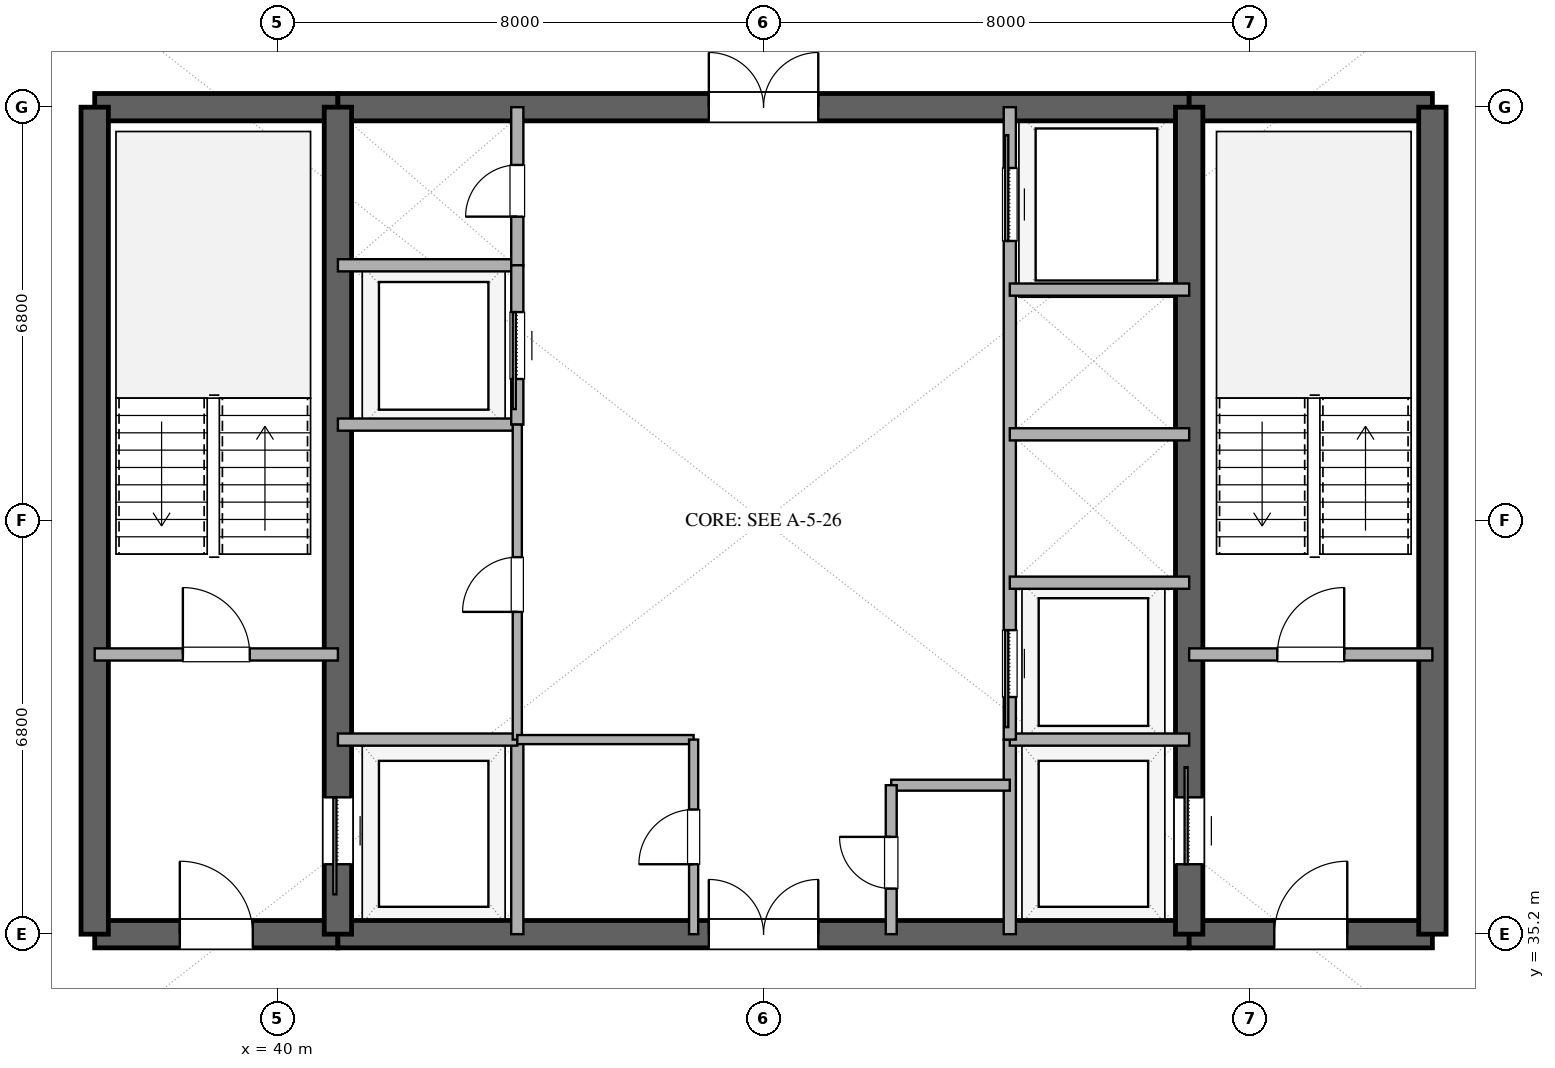
"""IFC4 building model, lengths in metres.
Left out: names, types, materials, properties, quantities, classifications, styles, units other than length and angle.
Written with IfcOpenShell. Run it as: python <this file> out.ifc"""

import sys

from ifc_helpers import new_model, si_unit, direction, frame, frame_2d, origin, place, context, subcontext, project, spatial, rectangle, extrude, element, fill, save


model = new_model("IFC4")
c1 = context("Model", 3, precision=1e-05, world=origin(), true_north=direction((0.0, 1.0)))
c2 = subcontext(c1, "Body", "Model", "MODEL_VIEW")
j1 = project(units=[si_unit("LENGTHUNIT", "METRE"), si_unit("PLANEANGLEUNIT", "RADIAN")], contexts=[c1])
p1 = place(None, origin())
s1 = spatial("IfcSite", under=j1, at=p1, CompositionType="ELEMENT")
p2 = place(p1, origin())
s2 = spatial("IfcBuilding", under=s1, at=p2, CompositionType="ELEMENT")
p3 = place(p2, frame((0.0, 0.0, 165.0)))
s3 = spatial("IfcBuildingStorey", under=s2, at=p3, CompositionType="ELEMENT", Elevation=165.0)
p4 = place(p3, frame((37.0, 35.2, 0.0), z_axis=(0.0, 0.0, 1.0), x_axis=(1.0, 0.0, 0.0)))
e1 = element("IfcWall", 1, at=p4, inside=s3, PredefinedType="SHEAR", context=c2, shape_type="SweptSolid", body=[
    extrude(rectangle(XDim=4.0, YDim=0.45, at=frame_2d((2.0, 0.0))), origin(), (0.0, 0.0, 1.0), 3.38),
])
p5 = place(p4, frame((1.4, 0.0, 0.0)))
e2 = element("IfcOpeningElement", 2, at=p5, cuts=e1, PredefinedType="OPENING", context=c2, shape_type="SweptSolid", body=[
    extrude(rectangle(XDim=1.2, YDim=2.15, at=frame_2d((0.6, 1.075))), frame((0.0, 0.235, 0.0), z_axis=(0.0, -1.0, 0.0), x_axis=(1.0, 0.0, 0.0)), (0.0, 0.0, 1.0), 0.47),
])
p6 = place(p3, frame((41.0, 35.2, 0.0), z_axis=(0.0, 0.0, 1.0), x_axis=(1.0, 0.0, 0.0)))
e3 = element("IfcWall", 3, at=p6, inside=s3, PredefinedType="SHEAR", context=c2, shape_type="SweptSolid", body=[
    extrude(rectangle(XDim=14.0, YDim=0.45, at=frame_2d((7.0, 0.0))), origin(), (0.0, 0.0, 1.0), 3.38),
])
p7 = place(p6, frame((6.1, 0.0, 0.0)))
e4 = element("IfcOpeningElement", 4, at=p7, cuts=e3, PredefinedType="OPENING", context=c2, shape_type="SweptSolid", body=[
    extrude(rectangle(XDim=1.8, YDim=2.25, at=frame_2d((0.9, 1.125))), frame((0.0, 0.235, 0.0), z_axis=(0.0, -1.0, 0.0), x_axis=(1.0, 0.0, 0.0)), (0.0, 0.0, 1.0), 0.47),
])
p8 = place(p3, frame((55.0, 35.2, 0.0), z_axis=(0.0, 0.0, 1.0), x_axis=(1.0, 0.0, 0.0)))
e5 = element("IfcWall", 5, at=p8, inside=s3, PredefinedType="SHEAR", context=c2, shape_type="SweptSolid", body=[
    extrude(rectangle(XDim=4.0, YDim=0.45, at=frame_2d((2.0, 0.0))), origin(), (0.0, 0.0, 1.0), 3.38),
])
p9 = place(p8, frame((1.4, 0.0, 0.0)))
e6 = element("IfcOpeningElement", 6, at=p9, cuts=e5, PredefinedType="OPENING", context=c2, shape_type="SweptSolid", body=[
    extrude(rectangle(XDim=1.2, YDim=2.15, at=frame_2d((0.6, 1.075))), frame((0.0, 0.235, 0.0), z_axis=(0.0, -1.0, 0.0), x_axis=(1.0, 0.0, 0.0)), (0.0, 0.0, 1.0), 0.47),
])
p10 = place(p3, frame((37.0, 48.8, 0.0), z_axis=(0.0, 0.0, 1.0), x_axis=(1.0, 0.0, 0.0)))
e7 = element("IfcWall", 7, at=p10, inside=s3, PredefinedType="SHEAR", context=c2, shape_type="SweptSolid", body=[
    extrude(rectangle(XDim=4.0, YDim=0.45, at=frame_2d((2.0, 0.0))), origin(), (0.0, 0.0, 1.0), 3.38),
])
p11 = place(p3, frame((41.0, 48.8, 0.0), z_axis=(0.0, 0.0, 1.0), x_axis=(1.0, 0.0, 0.0)))
e8 = element("IfcWall", 8, at=p11, inside=s3, PredefinedType="SHEAR", context=c2, shape_type="SweptSolid", body=[
    extrude(rectangle(XDim=14.0, YDim=0.45, at=frame_2d((7.0, 0.0))), origin(), (0.0, 0.0, 1.0), 3.38),
])
p12 = place(p11, frame((6.1, 0.0, 0.0)))
e9 = element("IfcOpeningElement", 9, at=p12, cuts=e8, PredefinedType="OPENING", context=c2, shape_type="SweptSolid", body=[
    extrude(rectangle(XDim=1.8, YDim=2.25, at=frame_2d((0.9, 1.125))), frame((0.0, 0.235, 0.0), z_axis=(0.0, -1.0, 0.0), x_axis=(1.0, 0.0, 0.0)), (0.0, 0.0, 1.0), 0.47),
])
p13 = place(p3, frame((55.0, 48.8, 0.0), z_axis=(0.0, 0.0, 1.0), x_axis=(1.0, 0.0, 0.0)))
e10 = element("IfcWall", 10, at=p13, inside=s3, PredefinedType="SHEAR", context=c2, shape_type="SweptSolid", body=[
    extrude(rectangle(XDim=4.0, YDim=0.45, at=frame_2d((2.0, 0.0))), origin(), (0.0, 0.0, 1.0), 3.38),
])
for number, where, z_axis, x_axis in (
    (11, (37.0, 35.2, 0.0), (0.0, 0.0, 1.0), (0.0, 1.0, 0.0)),
    (12, (59.0, 35.2, 0.0), (0.0, 0.0, 1.0), (0.0, 1.0, 0.0)),
):
    element("IfcWall", number, at=place(p3, frame(where, z_axis=z_axis, x_axis=x_axis)), inside=s3, PredefinedType="SHEAR", context=c2, shape_type="SweptSolid", body=[
        extrude(rectangle(XDim=13.6, YDim=0.45, at=frame_2d((6.8, 0.0))), origin(), (0.0, 0.0, 1.0), 3.38),
    ])
p14 = place(p3, frame((41.0, 35.2, 0.0), z_axis=(0.0, 0.0, 1.0), x_axis=(0.0, 1.0, 0.0)))
e13 = element("IfcWall", 13, at=p14, inside=s3, PredefinedType="SHEAR", context=c2, shape_type="SweptSolid", body=[
    extrude(rectangle(XDim=13.6, YDim=0.45, at=frame_2d((6.8, 0.0))), origin(), (0.0, 0.0, 1.0), 3.38),
])
p15 = place(p14, frame((1.15, 0.0, 0.0)))
e14 = element("IfcOpeningElement", 14, at=p15, cuts=e13, PredefinedType="OPENING", context=c2, shape_type="SweptSolid", body=[
    extrude(rectangle(XDim=1.1, YDim=2.2, at=frame_2d((0.55, 1.1))), frame((0.0, 0.235, 0.0), z_axis=(0.0, -1.0, 0.0), x_axis=(1.0, 0.0, 0.0)), (0.0, 0.0, 1.0), 0.47),
])
p16 = place(p3, frame((55.0, 35.2, 0.0), z_axis=(0.0, 0.0, 1.0), x_axis=(0.0, 1.0, 0.0)))
e15 = element("IfcWall", 15, at=p16, inside=s3, PredefinedType="SHEAR", context=c2, shape_type="SweptSolid", body=[
    extrude(rectangle(XDim=13.6, YDim=0.45, at=frame_2d((6.8, 0.0))), origin(), (0.0, 0.0, 1.0), 3.38),
])
p17 = place(p16, frame((1.15, 0.0, 0.0)))
e16 = element("IfcOpeningElement", 16, at=p17, cuts=e15, PredefinedType="OPENING", context=c2, shape_type="SweptSolid", body=[
    extrude(rectangle(XDim=1.1, YDim=2.2, at=frame_2d((0.55, 1.1))), frame((0.0, 0.235, 0.0), z_axis=(0.0, -1.0, 0.0), x_axis=(1.0, 0.0, 0.0)), (0.0, 0.0, 1.0), 0.47),
])
p18 = place(p3, frame((37.0, 39.8, 0.0), z_axis=(0.0, 0.0, 1.0), x_axis=(1.0, 0.0, 0.0)))
e17 = element("IfcWall", 17, at=p18, inside=s3, PredefinedType="SOLIDWALL", context=c2, shape_type="SweptSolid", body=[
    extrude(rectangle(XDim=4.0, YDim=0.2, at=frame_2d((2.0, 0.0))), origin(), (0.0, 0.0, 1.0), 2.74),
])
p19 = place(p18, frame((1.45, 0.0, 0.0)))
e18 = element("IfcOpeningElement", 18, at=p19, cuts=e17, PredefinedType="OPENING", context=c2, shape_type="SweptSolid", body=[
    extrude(rectangle(XDim=1.1, YDim=2.15, at=frame_2d((0.55, 1.075))), frame((0.0, 0.11, 0.0), z_axis=(0.0, -1.0, 0.0), x_axis=(1.0, 0.0, 0.0)), (0.0, 0.0, 1.0), 0.22),
])
p20 = place(p3, frame((55.0, 39.8, 0.0), z_axis=(0.0, 0.0, 1.0), x_axis=(1.0, 0.0, 0.0)))
e19 = element("IfcWall", 19, at=p20, inside=s3, PredefinedType="SOLIDWALL", context=c2, shape_type="SweptSolid", body=[
    extrude(rectangle(XDim=4.0, YDim=0.2, at=frame_2d((2.0, 0.0))), origin(), (0.0, 0.0, 1.0), 2.74),
])
p21 = place(p20, frame((1.45, 0.0, 0.0)))
e20 = element("IfcOpeningElement", 20, at=p21, cuts=e19, PredefinedType="OPENING", context=c2, shape_type="SweptSolid", body=[
    extrude(rectangle(XDim=1.1, YDim=2.15, at=frame_2d((0.55, 1.075))), frame((0.0, 0.11, 0.0), z_axis=(0.0, -1.0, 0.0), x_axis=(1.0, 0.0, 0.0)), (0.0, 0.0, 1.0), 0.22),
])
p22 = place(p3, frame((43.95, 35.2, 0.0), z_axis=(0.0, 0.0, 1.0), x_axis=(0.0, 1.0, 0.0)))
e21 = element("IfcWall", 21, at=p22, inside=s3, PredefinedType="SOLIDWALL", context=c2, shape_type="SweptSolid", body=[
    extrude(rectangle(XDim=3.2, YDim=0.2, at=frame_2d((1.6, 0.0))), origin(), (0.0, 0.0, 1.0), 2.74),
])
p23 = place(p3, frame((41.0, 38.4, 0.0), z_axis=(0.0, 0.0, 1.0), x_axis=(1.0, 0.0, 0.0)))
e22 = element("IfcWall", 22, at=p23, inside=s3, PredefinedType="SOLIDWALL", context=c2, shape_type="SweptSolid", body=[
    extrude(rectangle(XDim=2.95, YDim=0.2, at=frame_2d((1.475, 0.0))), origin(), (0.0, 0.0, 1.0), 2.74),
])
p24 = place(p3, frame((52.05, 35.2, 0.0), z_axis=(0.0, 0.0, 1.0), x_axis=(0.0, 1.0, 0.0)))
e23 = element("IfcWall", 23, at=p24, inside=s3, PredefinedType="SOLIDWALL", context=c2, shape_type="SweptSolid", body=[
    extrude(rectangle(XDim=3.2, YDim=0.2, at=frame_2d((1.6, 0.0))), origin(), (0.0, 0.0, 1.0), 2.74),
])
for number, where, z_axis, x_axis in (
    (24, (52.05, 38.4, 0.0), (0.0, 0.0, 1.0), (1.0, 0.0, 0.0)),
    (25, (41.0, 46.2, 0.0), (0.0, 0.0, 1.0), (1.0, 0.0, 0.0)),
):
    element("IfcWall", number, at=place(p3, frame(where, z_axis=z_axis, x_axis=x_axis)), inside=s3, PredefinedType="SOLIDWALL", context=c2, shape_type="SweptSolid", body=[
        extrude(rectangle(XDim=2.95, YDim=0.2, at=frame_2d((1.475, 0.0))), origin(), (0.0, 0.0, 1.0), 2.74),
    ])
p25 = place(p3, frame((43.95, 46.2, 0.0), z_axis=(0.0, 0.0, 1.0), x_axis=(0.0, 1.0, 0.0)))
e26 = element("IfcWall", 26, at=p25, inside=s3, PredefinedType="SOLIDWALL", context=c2, shape_type="SweptSolid", body=[
    extrude(rectangle(XDim=2.6, YDim=0.2, at=frame_2d((1.3, 0.0))), origin(), (0.0, 0.0, 1.0), 2.74),
])
p26 = place(p25, frame((0.8, 0.0, 0.0)))
e27 = element("IfcOpeningElement", 27, at=p26, cuts=e26, PredefinedType="OPENING", context=c2, shape_type="SweptSolid", body=[
    extrude(rectangle(XDim=0.85, YDim=2.15, at=frame_2d((0.425, 1.075))), frame((0.0, 0.11, 0.0), z_axis=(0.0, -1.0, 0.0), x_axis=(1.0, 0.0, 0.0)), (0.0, 0.0, 1.0), 0.22),
])
p27 = place(p3, frame((41.0, 43.58, 0.0), z_axis=(0.0, 0.0, 1.0), x_axis=(1.0, 0.0, 0.0)))
e28 = element("IfcWall", 28, at=p27, inside=s3, PredefinedType="SOLIDWALL", context=c2, shape_type="SweptSolid", body=[
    extrude(rectangle(XDim=2.95, YDim=0.2, at=frame_2d((1.475, 0.0))), origin(), (0.0, 0.0, 1.0), 2.74),
])
p28 = place(p3, frame((43.95, 43.58, 0.0), z_axis=(0.0, 0.0, 1.0), x_axis=(0.0, 1.0, 0.0)))
e29 = element("IfcWall", 29, at=p28, inside=s3, PredefinedType="SOLIDWALL", context=c2, shape_type="SweptSolid", body=[
    extrude(rectangle(XDim=2.62, YDim=0.2, at=frame_2d((1.31, 0.0))), origin(), (0.0, 0.0, 1.0), 2.74),
])
p29 = place(p28, frame((0.75, 0.0, 0.0)))
e30 = element("IfcOpeningElement", 30, at=p29, cuts=e29, PredefinedType="OPENING", context=c2, shape_type="SweptSolid", body=[
    extrude(rectangle(XDim=1.1, YDim=2.2, at=frame_2d((0.55, 1.1))), frame((0.0, 0.11, 0.0), z_axis=(0.0, -1.0, 0.0), x_axis=(1.0, 0.0, 0.0)), (0.0, 0.0, 1.0), 0.22),
])
p30 = place(p3, frame((43.95, 38.4, 0.0), z_axis=(0.0, 0.0, 1.0), x_axis=(0.0, 1.0, 0.0)))
e31 = element("IfcWall", 31, at=p30, inside=s3, PredefinedType="PARTITIONING", context=c2, shape_type="SweptSolid", body=[
    extrude(rectangle(XDim=5.18, YDim=0.15, at=frame_2d((2.59, 0.0))), origin(), (0.0, 0.0, 1.0), 2.74),
])
p31 = place(p30, frame((2.1, 0.0, 0.0)))
e32 = element("IfcOpeningElement", 32, at=p31, cuts=e31, PredefinedType="OPENING", context=c2, shape_type="SweptSolid", body=[
    extrude(rectangle(XDim=0.9, YDim=2.15, at=frame_2d((0.45, 1.075))), frame((0.0, 0.085, 0.0), z_axis=(0.0, -1.0, 0.0), x_axis=(1.0, 0.0, 0.0)), (0.0, 0.0, 1.0), 0.17),
])
p32 = place(p3, frame((52.05, 38.4, 0.0), z_axis=(0.0, 0.0, 1.0), x_axis=(0.0, 1.0, 0.0)))
e33 = element("IfcWall", 33, at=p32, inside=s3, PredefinedType="SOLIDWALL", context=c2, shape_type="SweptSolid", body=[
    extrude(rectangle(XDim=10.4, YDim=0.2, at=frame_2d((5.2, 0.0))), origin(), (0.0, 0.0, 1.0), 2.74),
])
p33 = place(p32, frame((0.7, 0.0, 0.0)))
e34 = element("IfcOpeningElement", 34, at=p33, cuts=e33, PredefinedType="OPENING", context=c2, shape_type="SweptSolid", body=[
    extrude(rectangle(XDim=1.1, YDim=2.2, at=frame_2d((0.55, 1.1))), frame((0.0, 0.11, 0.0), z_axis=(0.0, -1.0, 0.0), x_axis=(1.0, 0.0, 0.0)), (0.0, 0.0, 1.0), 0.22),
])
p34 = place(p32, frame((8.2, 0.0, 0.0)))
e35 = element("IfcOpeningElement", 35, at=p34, cuts=e33, PredefinedType="OPENING", context=c2, shape_type="SweptSolid", body=[
    extrude(rectangle(XDim=1.2, YDim=2.2, at=frame_2d((0.6, 1.1))), frame((0.0, 0.11, 0.0), z_axis=(0.0, -1.0, 0.0), x_axis=(1.0, 0.0, 0.0)), (0.0, 0.0, 1.0), 0.22),
])
for number, where, z_axis, x_axis in (
    (36, (52.05, 40.98, 0.0), (0.0, 0.0, 1.0), (1.0, 0.0, 0.0)),
    (37, (52.05, 43.42, 0.0), (0.0, 0.0, 1.0), (1.0, 0.0, 0.0)),
    (38, (52.05, 45.8, 0.0), (0.0, 0.0, 1.0), (1.0, 0.0, 0.0)),
):
    element("IfcWall", number, at=place(p3, frame(where, z_axis=z_axis, x_axis=x_axis)), inside=s3, PredefinedType="SOLIDWALL", context=c2, shape_type="SweptSolid", body=[
        extrude(rectangle(XDim=2.95, YDim=0.2, at=frame_2d((1.475, 0.0))), origin(), (0.0, 0.0, 1.0), 2.74),
    ])
p35 = place(p3, frame((43.95, 38.4, 0.0), z_axis=(0.0, 0.0, 1.0), x_axis=(1.0, 0.0, 0.0)))
e39 = element("IfcWall", 39, at=p35, inside=s3, PredefinedType="PARTITIONING", context=c2, shape_type="SweptSolid", body=[
    extrude(rectangle(XDim=2.9, YDim=0.15, at=frame_2d((1.45, 0.0))), origin(), (0.0, 0.0, 1.0), 2.74),
])
p36 = place(p3, frame((46.85, 35.2, 0.0), z_axis=(0.0, 0.0, 1.0), x_axis=(0.0, 1.0, 0.0)))
e40 = element("IfcWall", 40, at=p36, inside=s3, PredefinedType="PARTITIONING", context=c2, shape_type="SweptSolid", body=[
    extrude(rectangle(XDim=3.2, YDim=0.15, at=frame_2d((1.6, 0.0))), origin(), (0.0, 0.0, 1.0), 2.74),
])
p37 = place(p36, frame((1.15, 0.0, 0.0)))
e41 = element("IfcOpeningElement", 41, at=p37, cuts=e40, PredefinedType="OPENING", context=c2, shape_type="SweptSolid", body=[
    extrude(rectangle(XDim=0.9, YDim=2.15, at=frame_2d((0.45, 1.075))), frame((0.0, 0.085, 0.0), z_axis=(0.0, -1.0, 0.0), x_axis=(1.0, 0.0, 0.0)), (0.0, 0.0, 1.0), 0.17),
])
p38 = place(p3, frame((50.1, 37.65, 0.0), z_axis=(0.0, 0.0, 1.0), x_axis=(1.0, 0.0, 0.0)))
e42 = element("IfcWall", 42, at=p38, inside=s3, PredefinedType="PLUMBINGWALL", context=c2, shape_type="SweptSolid", body=[
    extrude(rectangle(XDim=1.95, YDim=0.18, at=frame_2d((0.975, 0.0))), origin(), (0.0, 0.0, 1.0), 2.74),
])
p39 = place(p3, frame((50.1, 35.2, 0.0), z_axis=(0.0, 0.0, 1.0), x_axis=(0.0, 1.0, 0.0)))
e43 = element("IfcWall", 43, at=p39, inside=s3, PredefinedType="PLUMBINGWALL", context=c2, shape_type="SweptSolid", body=[
    extrude(rectangle(XDim=2.45, YDim=0.18, at=frame_2d((1.225, 0.0))), origin(), (0.0, 0.0, 1.0), 2.74),
])
p40 = place(p39, frame((0.75, 0.0, 0.0)))
e44 = element("IfcOpeningElement", 44, at=p40, cuts=e43, PredefinedType="OPENING", context=c2, shape_type="SweptSolid", body=[
    extrude(rectangle(XDim=0.85, YDim=2.1, at=frame_2d((0.425, 1.05))), frame((0.0, 0.1, 0.0), z_axis=(0.0, -1.0, 0.0), x_axis=(1.0, 0.0, 0.0)), (0.0, 0.0, 1.0), 0.2),
])
p41 = place(p15, origin())
e45 = element("IfcDoor", 45, at=p41, inside=s3, OperationType="SLIDING_TO_LEFT", PredefinedType="DOOR", context=c2, shape_type="SweptSolid", body=[
    extrude(rectangle(XDim=1.1, YDim=2.2, at=frame_2d((0.55, 1.1))), frame((0.0, 0.025, 0.0), z_axis=(0.0, -1.0, 0.0), x_axis=(1.0, 0.0, 0.0)), (0.0, 0.0, 1.0), 0.05),
])
fill(e14, e45)
p42 = place(p17, origin())
e46 = element("IfcDoor", 46, at=p42, inside=s3, OperationType="SLIDING_TO_RIGHT", PredefinedType="DOOR", context=c2, shape_type="SweptSolid", body=[
    extrude(rectangle(XDim=1.1, YDim=2.2, at=frame_2d((0.55, 1.1))), frame((0.0, 0.025, 0.0), z_axis=(0.0, -1.0, 0.0), x_axis=(1.0, 0.0, 0.0)), (0.0, 0.0, 1.0), 0.05),
])
fill(e16, e46)
p43 = place(p5, origin())
e47 = element("IfcDoor", 47, at=p43, inside=s3, OperationType="SINGLE_SWING_LEFT", PredefinedType="DOOR", context=c2, shape_type="SweptSolid", body=[
    extrude(rectangle(XDim=1.2, YDim=2.15, at=frame_2d((0.6, 1.075))), frame((0.0, 0.025, 0.0), z_axis=(0.0, -1.0, 0.0), x_axis=(1.0, 0.0, 0.0)), (0.0, 0.0, 1.0), 0.05),
])
fill(e2, e47)
p44 = place(p9, origin())
e48 = element("IfcDoor", 48, at=p44, inside=s3, OperationType="SINGLE_SWING_RIGHT", PredefinedType="DOOR", context=c2, shape_type="SweptSolid", body=[
    extrude(rectangle(XDim=1.2, YDim=2.15, at=frame_2d((0.6, 1.075))), frame((0.0, 0.025, 0.0), z_axis=(0.0, -1.0, 0.0), x_axis=(1.0, 0.0, 0.0)), (0.0, 0.0, 1.0), 0.05),
])
fill(e6, e48)
p45 = place(p7, origin())
e49 = element("IfcDoor", 49, at=p45, inside=s3, OperationType="DOUBLE_DOOR_SINGLE_SWING", PredefinedType="DOOR", context=c2, shape_type="SweptSolid", body=[
    extrude(rectangle(XDim=1.8, YDim=2.25, at=frame_2d((0.9, 1.125))), frame((0.0, 0.025, 0.0), z_axis=(0.0, -1.0, 0.0), x_axis=(1.0, 0.0, 0.0)), (0.0, 0.0, 1.0), 0.05),
])
fill(e4, e49)
p46 = place(p12, origin())
e50 = element("IfcDoor", 50, at=p46, inside=s3, OperationType="DOUBLE_DOOR_SINGLE_SWING", PredefinedType="DOOR", context=c2, shape_type="SweptSolid", body=[
    extrude(rectangle(XDim=1.8, YDim=2.25, at=frame_2d((0.9, 1.125))), frame((0.0, 0.025, 0.0), z_axis=(0.0, -1.0, 0.0), x_axis=(1.0, 0.0, 0.0)), (0.0, 0.0, 1.0), 0.05),
])
fill(e9, e50)
p47 = place(p19, origin())
e51 = element("IfcDoor", 51, at=p47, inside=s3, OperationType="SINGLE_SWING_LEFT", PredefinedType="DOOR", context=c2, shape_type="SweptSolid", body=[
    extrude(rectangle(XDim=1.1, YDim=2.15, at=frame_2d((0.55, 1.075))), frame((0.0, 0.025, 0.0), z_axis=(0.0, -1.0, 0.0), x_axis=(1.0, 0.0, 0.0)), (0.0, 0.0, 1.0), 0.05),
])
fill(e18, e51)
p48 = place(p21, origin())
e52 = element("IfcDoor", 52, at=p48, inside=s3, OperationType="SINGLE_SWING_RIGHT", PredefinedType="DOOR", context=c2, shape_type="SweptSolid", body=[
    extrude(rectangle(XDim=1.1, YDim=2.15, at=frame_2d((0.55, 1.075))), frame((0.0, 0.025, 0.0), z_axis=(0.0, -1.0, 0.0), x_axis=(1.0, 0.0, 0.0)), (0.0, 0.0, 1.0), 0.05),
])
fill(e20, e52)
p49 = place(p26, origin())
e53 = element("IfcDoor", 53, at=p49, inside=s3, OperationType="SINGLE_SWING_LEFT", PredefinedType="DOOR", context=c2, shape_type="SweptSolid", body=[
    extrude(rectangle(XDim=0.85, YDim=2.15, at=frame_2d((0.425, 1.075))), frame((0.0, 0.025, 0.0), z_axis=(0.0, -1.0, 0.0), x_axis=(1.0, 0.0, 0.0)), (0.0, 0.0, 1.0), 0.05),
])
fill(e27, e53)
p50 = place(p29, origin())
e54 = element("IfcDoor", 54, at=p50, inside=s3, OperationType="SLIDING_TO_LEFT", PredefinedType="DOOR", context=c2, shape_type="SweptSolid", body=[
    extrude(rectangle(XDim=1.1, YDim=2.2, at=frame_2d((0.55, 1.1))), frame((0.0, 0.025, 0.0), z_axis=(0.0, -1.0, 0.0), x_axis=(1.0, 0.0, 0.0)), (0.0, 0.0, 1.0), 0.05),
])
fill(e30, e54)
p51 = place(p31, origin())
e55 = element("IfcDoor", 55, at=p51, inside=s3, OperationType="SINGLE_SWING_LEFT", PredefinedType="DOOR", context=c2, shape_type="SweptSolid", body=[
    extrude(rectangle(XDim=0.9, YDim=2.15, at=frame_2d((0.45, 1.075))), frame((0.0, 0.025, 0.0), z_axis=(0.0, -1.0, 0.0), x_axis=(1.0, 0.0, 0.0)), (0.0, 0.0, 1.0), 0.05),
])
fill(e32, e55)
p52 = place(p33, origin())
e56 = element("IfcDoor", 56, at=p52, inside=s3, OperationType="SLIDING_TO_LEFT", PredefinedType="DOOR", context=c2, shape_type="SweptSolid", body=[
    extrude(rectangle(XDim=1.1, YDim=2.2, at=frame_2d((0.55, 1.1))), frame((0.0, 0.025, 0.0), z_axis=(0.0, -1.0, 0.0), x_axis=(1.0, 0.0, 0.0)), (0.0, 0.0, 1.0), 0.05),
])
fill(e34, e56)
p53 = place(p34, origin())
e57 = element("IfcDoor", 57, at=p53, inside=s3, OperationType="SLIDING_TO_RIGHT", PredefinedType="DOOR", context=c2, shape_type="SweptSolid", body=[
    extrude(rectangle(XDim=1.2, YDim=2.2, at=frame_2d((0.6, 1.1))), frame((0.0, 0.025, 0.0), z_axis=(0.0, -1.0, 0.0), x_axis=(1.0, 0.0, 0.0)), (0.0, 0.0, 1.0), 0.05),
])
fill(e35, e57)
p54 = place(p37, origin())
e58 = element("IfcDoor", 58, at=p54, inside=s3, OperationType="SINGLE_SWING_LEFT", PredefinedType="DOOR", context=c2, shape_type="SweptSolid", body=[
    extrude(rectangle(XDim=0.9, YDim=2.15, at=frame_2d((0.45, 1.075))), frame((0.0, 0.025, 0.0), z_axis=(0.0, -1.0, 0.0), x_axis=(1.0, 0.0, 0.0)), (0.0, 0.0, 1.0), 0.05),
])
fill(e41, e58)
p55 = place(p40, origin())
e59 = element("IfcDoor", 59, at=p55, inside=s3, OperationType="SINGLE_SWING_RIGHT", PredefinedType="DOOR", context=c2, shape_type="SweptSolid", body=[
    extrude(rectangle(XDim=0.85, YDim=2.1, at=frame_2d((0.425, 1.05))), frame((0.0, 0.025, 0.0), z_axis=(0.0, -1.0, 0.0), x_axis=(1.0, 0.0, 0.0)), (0.0, 0.0, 1.0), 0.05),
])
fill(e44, e59)
save(model, sys.argv[1])
